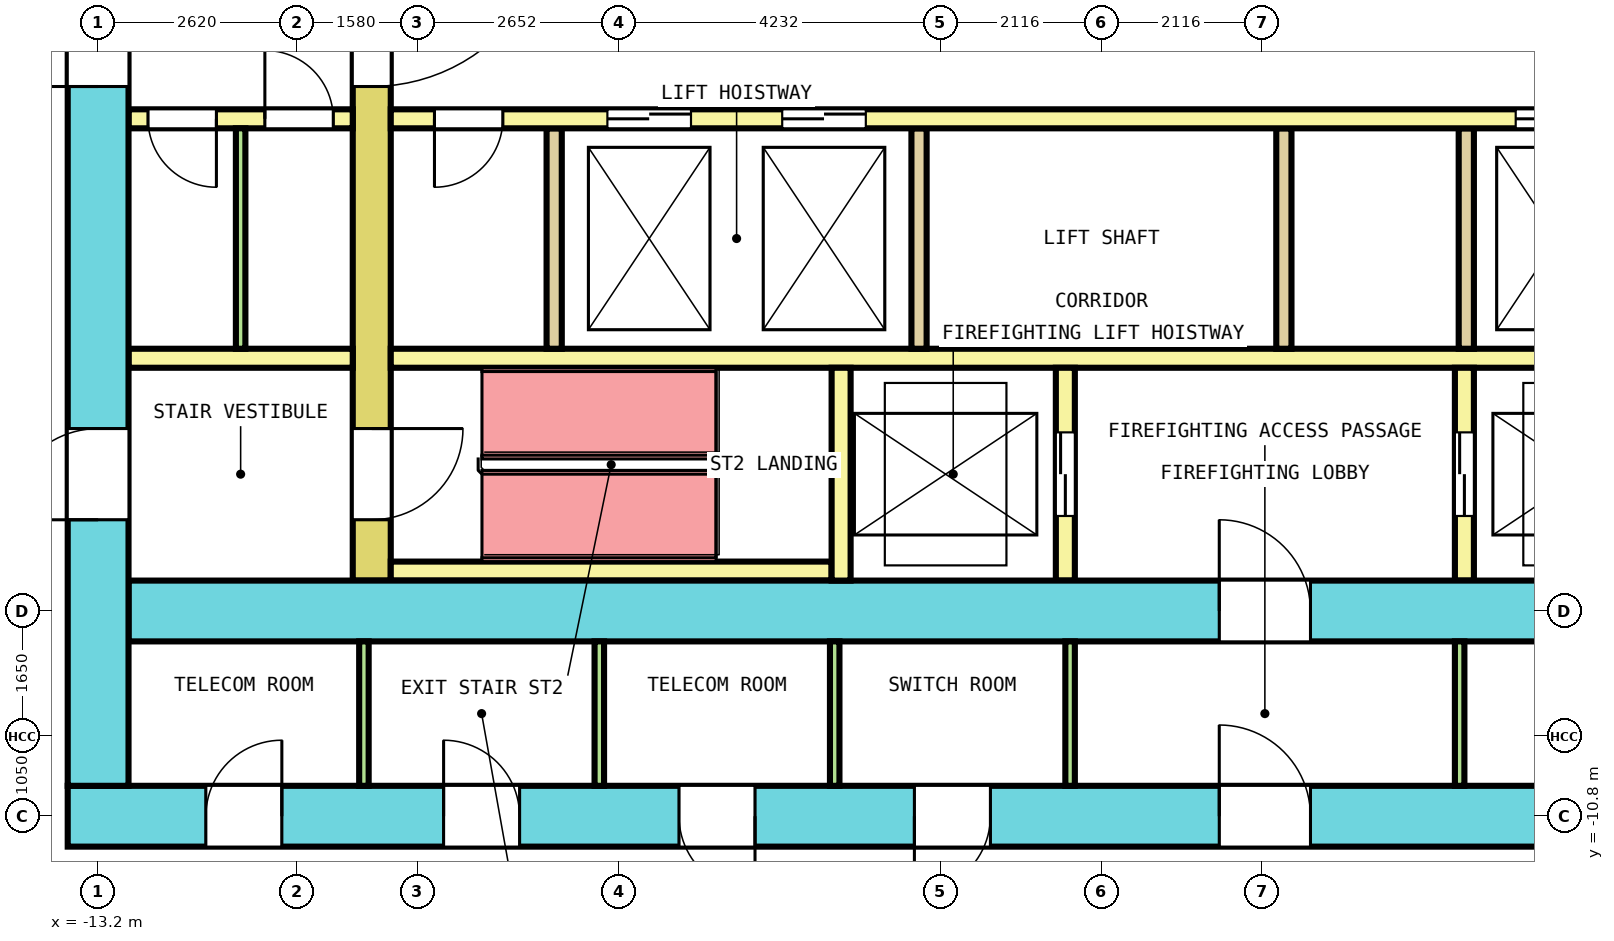
"""IFC4 building model, lengths in metres.
Left out: names, types, materials, properties, quantities, classifications, styles, units other than length and angle.
Written with IfcOpenShell. Run it as: python <this file> out.ifc"""

import sys

from ifc_helpers import new_model, si_unit, direction, frame, frame_2d, origin, place, context, subcontext, project, spatial, rectangle, extrude, element, fill, save


model = new_model("IFC4")
c1 = context("Model", 3, precision=1e-05, world=origin(), true_north=direction((0.0, 1.0)))
c2 = subcontext(c1, "Body", "Model", "MODEL_VIEW")
j1 = project(units=[si_unit("LENGTHUNIT", "METRE"), si_unit("PLANEANGLEUNIT", "RADIAN")], contexts=[c1])
p1 = place(None, origin())
s1 = spatial("IfcSite", under=j1, at=p1, CompositionType="ELEMENT")
p2 = place(p1, origin())
s2 = spatial("IfcBuilding", under=s1, at=p2, CompositionType="ELEMENT")
p3 = place(p2, frame((0.0, 0.0, 113.2)))
s3 = spatial("IfcBuildingStorey", under=s2, at=p3, CompositionType="ELEMENT", Elevation=113.2)
p4 = place(p3, frame((-13.6, -10.8, 0.0), z_axis=(0.0, 0.0, 1.0), x_axis=(1.0, 0.0, 0.0)))
e1 = element("IfcWall", 1, at=p4, inside=s3, PredefinedType="SHEAR", context=c2, shape_type="SweptSolid", body=[
    extrude(rectangle(XDim=27.2, YDim=0.8, at=frame_2d((13.6, 0.0))), origin(), (0.0, 0.0, 1.0), 4.1),
])
p5 = place(p4, frame((1.817, 0.0, 0.0)))
e2 = element("IfcOpeningElement", 2, at=p5, cuts=e1, PredefinedType="OPENING", context=c2, shape_type="SweptSolid", body=[
    extrude(rectangle(XDim=1.0, YDim=2.1, at=frame_2d((0.5, 1.05))), frame((0.0, 0.41, 0.0), z_axis=(0.0, -1.0, 0.0), x_axis=(1.0, 0.0, 0.0)), (0.0, 0.0, 1.0), 0.82),
])
p6 = place(p4, frame((4.945, 0.0, 0.0)))
e3 = element("IfcOpeningElement", 3, at=p6, cuts=e1, PredefinedType="OPENING", context=c2, shape_type="SweptSolid", body=[
    extrude(rectangle(XDim=1.0, YDim=2.1, at=frame_2d((0.5, 1.05))), frame((0.0, 0.41, 0.0), z_axis=(0.0, -1.0, 0.0), x_axis=(1.0, 0.0, 0.0)), (0.0, 0.0, 1.0), 0.82),
])
p7 = place(p4, frame((8.042, 0.0, 0.0)))
e4 = element("IfcOpeningElement", 4, at=p7, cuts=e1, PredefinedType="OPENING", context=c2, shape_type="SweptSolid", body=[
    extrude(rectangle(XDim=1.0, YDim=2.1, at=frame_2d((0.5, 1.05))), frame((0.0, 0.41, 0.0), z_axis=(0.0, -1.0, 0.0), x_axis=(1.0, 0.0, 0.0)), (0.0, 0.0, 1.0), 0.82),
])
p8 = place(p4, frame((11.139, 0.0, 0.0)))
e5 = element("IfcOpeningElement", 5, at=p8, cuts=e1, PredefinedType="OPENING", context=c2, shape_type="SweptSolid", body=[
    extrude(rectangle(XDim=1.0, YDim=2.1, at=frame_2d((0.5, 1.05))), frame((0.0, 0.41, 0.0), z_axis=(0.0, -1.0, 0.0), x_axis=(1.0, 0.0, 0.0)), (0.0, 0.0, 1.0), 0.82),
])
p9 = place(p4, frame((21.887, 0.0, 0.0)))
e6 = element("IfcOpeningElement", 6, at=p9, cuts=e1, PredefinedType="OPENING", context=c2, shape_type="SweptSolid", body=[
    extrude(rectangle(XDim=1.0, YDim=2.1, at=frame_2d((0.5, 1.05))), frame((0.0, 0.41, 0.0), z_axis=(0.0, -1.0, 0.0), x_axis=(1.0, 0.0, 0.0)), (0.0, 0.0, 1.0), 0.82),
])
p10 = place(p4, frame((15.15, 0.0, 0.0)))
e7 = element("IfcOpeningElement", 7, at=p10, cuts=e1, PredefinedType="OPENING", context=c2, shape_type="SweptSolid", body=[
    extrude(rectangle(XDim=1.2, YDim=2.1, at=frame_2d((0.6, 1.05))), frame((0.0, 0.41, 0.0), z_axis=(0.0, -1.0, 0.0), x_axis=(1.0, 0.0, 0.0)), (0.0, 0.0, 1.0), 0.82),
])
p11 = place(p3, frame((-13.2, -10.4, 0.0), z_axis=(0.0, 0.0, 1.0), x_axis=(0.0, 1.0, 0.0)))
e8 = element("IfcWall", 8, at=p11, inside=s3, PredefinedType="SHEAR", context=c2, shape_type="SweptSolid", body=[
    extrude(rectangle(XDim=20.8, YDim=0.8, at=frame_2d((10.4, 0.0))), origin(), (0.0, 0.0, 1.0), 4.1),
])
p12 = place(p11, frame((9.2, 0.0, 0.0)))
e9 = element("IfcOpeningElement", 9, at=p12, cuts=e8, PredefinedType="OPENING", context=c2, shape_type="SweptSolid", body=[
    extrude(rectangle(XDim=2.4, YDim=2.1, at=frame_2d((1.2, 1.05))), frame((0.0, 0.41, 0.0), z_axis=(0.0, -1.0, 0.0), x_axis=(1.0, 0.0, 0.0)), (0.0, 0.0, 1.0), 0.82),
])
p13 = place(p11, frame((16.1, 0.0, 0.0)))
e10 = element("IfcOpeningElement", 10, at=p13, cuts=e8, PredefinedType="OPENING", context=c2, shape_type="SweptSolid", body=[
    extrude(rectangle(XDim=1.2, YDim=2.1, at=frame_2d((0.6, 1.05))), frame((0.0, 0.41, 0.0), z_axis=(0.0, -1.0, 0.0), x_axis=(1.0, 0.0, 0.0)), (0.0, 0.0, 1.0), 0.82),
])
p14 = place(p11, frame((3.5, 0.0, 0.0)))
e11 = element("IfcOpeningElement", 11, at=p14, cuts=e8, PredefinedType="OPENING", context=c2, shape_type="SweptSolid", body=[
    extrude(rectangle(XDim=1.2, YDim=2.1, at=frame_2d((0.6, 1.05))), frame((0.0, 0.41, 0.0), z_axis=(0.0, -1.0, 0.0), x_axis=(1.0, 0.0, 0.0)), (0.0, 0.0, 1.0), 0.82),
])
p15 = place(p3, frame((-12.8, -8.1, 0.0), z_axis=(0.0, 0.0, 1.0), x_axis=(1.0, 0.0, 0.0)))
e12 = element("IfcWall", 12, at=p15, inside=s3, PredefinedType="SHEAR", context=c2, shape_type="SweptSolid", body=[
    extrude(rectangle(XDim=25.6, YDim=0.8, at=frame_2d((12.8, 0.0))), origin(), (0.0, 0.0, 1.0), 4.1),
])
p16 = place(p15, frame((14.35, 0.0, 0.0)))
e13 = element("IfcOpeningElement", 13, at=p16, cuts=e12, PredefinedType="OPENING", context=c2, shape_type="SweptSolid", body=[
    extrude(rectangle(XDim=1.2, YDim=2.1, at=frame_2d((0.6, 1.05))), frame((0.0, 0.41, 0.0), z_axis=(0.0, -1.0, 0.0), x_axis=(1.0, 0.0, 0.0)), (0.0, 0.0, 1.0), 0.82),
])
p17 = place(p3, frame((-9.6, -7.7, 0.0), z_axis=(0.0, 0.0, 1.0), x_axis=(0.0, 1.0, 0.0)))
e14 = element("IfcWall", 14, at=p17, inside=s3, PredefinedType="SHEAR", context=c2, shape_type="SweptSolid", body=[
    extrude(rectangle(XDim=15.4, YDim=0.5, at=frame_2d((7.7, 0.0))), origin(), (0.0, 0.0, 1.0), 4.1),
])
p18 = place(p17, frame((6.5, 0.0, 0.0)))
e15 = element("IfcOpeningElement", 15, at=p18, cuts=e14, PredefinedType="OPENING", context=c2, shape_type="SweptSolid", body=[
    extrude(rectangle(XDim=2.4, YDim=2.1, at=frame_2d((1.2, 1.05))), frame((0.0, 0.26, 0.0), z_axis=(0.0, -1.0, 0.0), x_axis=(1.0, 0.0, 0.0)), (0.0, 0.0, 1.0), 0.52),
])
p19 = place(p17, frame((13.4, 0.0, 0.0)))
e16 = element("IfcOpeningElement", 16, at=p19, cuts=e14, PredefinedType="OPENING", context=c2, shape_type="SweptSolid", body=[
    extrude(rectangle(XDim=1.2, YDim=2.1, at=frame_2d((0.6, 1.05))), frame((0.0, 0.26, 0.0), z_axis=(0.0, -1.0, 0.0), x_axis=(1.0, 0.0, 0.0)), (0.0, 0.0, 1.0), 0.52),
])
p20 = place(p17, frame((0.8, 0.0, 0.0)))
e17 = element("IfcOpeningElement", 17, at=p20, cuts=e14, PredefinedType="OPENING", context=c2, shape_type="SweptSolid", body=[
    extrude(rectangle(XDim=1.2, YDim=2.1, at=frame_2d((0.6, 1.05))), frame((0.0, 0.26, 0.0), z_axis=(0.0, -1.0, 0.0), x_axis=(1.0, 0.0, 0.0)), (0.0, 0.0, 1.0), 0.52),
])
p21 = place(p3, frame((-12.8, -1.625, 0.0), z_axis=(0.0, 0.0, 1.0), x_axis=(1.0, 0.0, 0.0)))
e18 = element("IfcWall", 18, at=p21, inside=s3, PredefinedType="SOLIDWALL", context=c2, shape_type="SweptSolid", body=[
    extrude(rectangle(XDim=2.95, YDim=0.25, at=frame_2d((1.475, 0.0))), origin(), (0.0, 0.0, 1.0), 4.1),
])
p22 = place(p21, frame((0.256, 0.0, 0.0)))
e19 = element("IfcOpeningElement", 19, at=p22, cuts=e18, PredefinedType="OPENING", context=c2, shape_type="SweptSolid", body=[
    extrude(rectangle(XDim=0.9, YDim=2.1, at=frame_2d((0.45, 1.05))), frame((0.0, 0.135, 0.0), z_axis=(0.0, -1.0, 0.0), x_axis=(1.0, 0.0, 0.0)), (0.0, 0.0, 1.0), 0.27),
])
p23 = place(p21, frame((1.794, 0.0, 0.0)))
e20 = element("IfcOpeningElement", 20, at=p23, cuts=e18, PredefinedType="OPENING", context=c2, shape_type="SweptSolid", body=[
    extrude(rectangle(XDim=0.9, YDim=2.1, at=frame_2d((0.45, 1.05))), frame((0.0, 0.135, 0.0), z_axis=(0.0, -1.0, 0.0), x_axis=(1.0, 0.0, 0.0)), (0.0, 0.0, 1.0), 0.27),
])
p24 = place(p3, frame((-9.35, -1.625, 0.0), z_axis=(0.0, 0.0, 1.0), x_axis=(1.0, 0.0, 0.0)))
e21 = element("IfcWall", 21, at=p24, inside=s3, PredefinedType="SOLIDWALL", context=c2, shape_type="SweptSolid", body=[
    extrude(rectangle(XDim=18.7, YDim=0.25, at=frame_2d((9.35, 0.0))), origin(), (0.0, 0.0, 1.0), 4.1),
])
p25 = place(p24, frame((2.85, 0.0, 0.0)))
e22 = element("IfcOpeningElement", 22, at=p25, cuts=e21, PredefinedType="OPENING", context=c2, shape_type="SweptSolid", body=[
    extrude(rectangle(XDim=1.1, YDim=2.1, at=frame_2d((0.55, 1.05))), frame((0.0, 0.135, 0.0), z_axis=(0.0, -1.0, 0.0), x_axis=(1.0, 0.0, 0.0)), (0.0, 0.0, 1.0), 0.27),
])
p26 = place(p24, frame((5.15, 0.0, 0.0)))
e23 = element("IfcOpeningElement", 23, at=p26, cuts=e21, PredefinedType="OPENING", context=c2, shape_type="SweptSolid", body=[
    extrude(rectangle(XDim=1.1, YDim=2.1, at=frame_2d((0.55, 1.05))), frame((0.0, 0.135, 0.0), z_axis=(0.0, -1.0, 0.0), x_axis=(1.0, 0.0, 0.0)), (0.0, 0.0, 1.0), 0.27),
])
p27 = place(p24, frame((14.8, 0.0, 0.0)))
e24 = element("IfcOpeningElement", 24, at=p27, cuts=e21, PredefinedType="OPENING", context=c2, shape_type="SweptSolid", body=[
    extrude(rectangle(XDim=1.1, YDim=2.1, at=frame_2d((0.55, 1.05))), frame((0.0, 0.135, 0.0), z_axis=(0.0, -1.0, 0.0), x_axis=(1.0, 0.0, 0.0)), (0.0, 0.0, 1.0), 0.27),
])
p28 = place(p24, frame((0.575, 0.0, 0.0)))
e25 = element("IfcOpeningElement", 25, at=p28, cuts=e21, PredefinedType="OPENING", context=c2, shape_type="SweptSolid", body=[
    extrude(rectangle(XDim=0.9, YDim=2.1, at=frame_2d((0.45, 1.05))), frame((0.0, 0.135, 0.0), z_axis=(0.0, -1.0, 0.0), x_axis=(1.0, 0.0, 0.0)), (0.0, 0.0, 1.0), 0.27),
])
p29 = place(p24, frame((17.225, 0.0, 0.0)))
e26 = element("IfcOpeningElement", 26, at=p29, cuts=e21, PredefinedType="OPENING", context=c2, shape_type="SweptSolid", body=[
    extrude(rectangle(XDim=0.9, YDim=2.1, at=frame_2d((0.45, 1.05))), frame((0.0, 0.135, 0.0), z_axis=(0.0, -1.0, 0.0), x_axis=(1.0, 0.0, 0.0)), (0.0, 0.0, 1.0), 0.27),
])
p30 = place(p3, frame((-12.8, -4.775, 0.0), z_axis=(0.0, 0.0, 1.0), x_axis=(1.0, 0.0, 0.0)))
e27 = element("IfcWall", 27, at=p30, inside=s3, PredefinedType="SOLIDWALL", context=c2, shape_type="SweptSolid", body=[
    extrude(rectangle(XDim=2.95, YDim=0.25, at=frame_2d((1.475, 0.0))), origin(), (0.0, 0.0, 1.0), 4.1),
])
p31 = place(p3, frame((-9.35, -4.775, 0.0), z_axis=(0.0, 0.0, 1.0), x_axis=(1.0, 0.0, 0.0)))
e28 = element("IfcWall", 28, at=p31, inside=s3, PredefinedType="SOLIDWALL", context=c2, shape_type="SweptSolid", body=[
    extrude(rectangle(XDim=18.7, YDim=0.25, at=frame_2d((9.35, 0.0))), origin(), (0.0, 0.0, 1.0), 4.1),
])
for number, where, z_axis, x_axis in (
    (29, (-7.2, -4.65, 0.0), (0.0, 0.0, 1.0), (0.0, 1.0, 0.0)),
    (30, (-2.4, -4.65, 0.0), (0.0, 0.0, 1.0), (0.0, 1.0, 0.0)),
    (31, (2.4, -4.65, 0.0), (0.0, 0.0, 1.0), (0.0, 1.0, 0.0)),
    (32, (4.8, -4.65, 0.0), (0.0, 0.0, 1.0), (0.0, 1.0, 0.0)),
):
    element("IfcWall", number, at=place(p3, frame(where, z_axis=z_axis, x_axis=x_axis)), inside=s3, PredefinedType="SOLIDWALL", context=c2, shape_type="SweptSolid", body=[
        extrude(rectangle(XDim=2.9, YDim=0.2, at=frame_2d((1.45, 0.0))), origin(), (0.0, 0.0, 1.0), 4.1),
    ])
p32 = place(p3, frame((-9.35, -7.575, 0.0), z_axis=(0.0, 0.0, 1.0), x_axis=(1.0, 0.0, 0.0)))
e33 = element("IfcWall", 33, at=p32, inside=s3, PredefinedType="SOLIDWALL", context=c2, shape_type="SweptSolid", body=[
    extrude(rectangle(XDim=5.8, YDim=0.25, at=frame_2d((2.9, 0.0))), origin(), (0.0, 0.0, 1.0), 4.1),
])
p33 = place(p3, frame((-3.425, -7.7, 0.0), z_axis=(0.0, 0.0, 1.0), x_axis=(0.0, 1.0, 0.0)))
e34 = element("IfcWall", 34, at=p33, inside=s3, PredefinedType="SOLIDWALL", context=c2, shape_type="SweptSolid", body=[
    extrude(rectangle(XDim=2.8, YDim=0.25, at=frame_2d((1.4, 0.0))), origin(), (0.0, 0.0, 1.0), 4.1),
])
p34 = place(p3, frame((-0.475, -7.7, 0.0), z_axis=(0.0, 0.0, 1.0), x_axis=(0.0, 1.0, 0.0)))
e35 = element("IfcWall", 35, at=p34, inside=s3, PredefinedType="SOLIDWALL", context=c2, shape_type="SweptSolid", body=[
    extrude(rectangle(XDim=2.8, YDim=0.25, at=frame_2d((1.4, 0.0))), origin(), (0.0, 0.0, 1.0), 4.1),
])
p35 = place(p34, frame((0.85, 0.0, 0.0)))
e36 = element("IfcOpeningElement", 36, at=p35, cuts=e35, PredefinedType="OPENING", context=c2, shape_type="SweptSolid", body=[
    extrude(rectangle(XDim=1.1, YDim=2.1, at=frame_2d((0.55, 1.05))), frame((0.0, 0.135, 0.0), z_axis=(0.0, -1.0, 0.0), x_axis=(1.0, 0.0, 0.0)), (0.0, 0.0, 1.0), 0.27),
])
p36 = place(p3, frame((4.775, -7.7, 0.0), z_axis=(0.0, 0.0, 1.0), x_axis=(0.0, 1.0, 0.0)))
e37 = element("IfcWall", 37, at=p36, inside=s3, PredefinedType="SOLIDWALL", context=c2, shape_type="SweptSolid", body=[
    extrude(rectangle(XDim=2.8, YDim=0.25, at=frame_2d((1.4, 0.0))), origin(), (0.0, 0.0, 1.0), 4.1),
])
p37 = place(p36, frame((0.85, 0.0, 0.0)))
e38 = element("IfcOpeningElement", 38, at=p37, cuts=e37, PredefinedType="OPENING", context=c2, shape_type="SweptSolid", body=[
    extrude(rectangle(XDim=1.1, YDim=2.1, at=frame_2d((0.55, 1.05))), frame((0.0, 0.135, 0.0), z_axis=(0.0, -1.0, 0.0), x_axis=(1.0, 0.0, 0.0)), (0.0, 0.0, 1.0), 0.27),
])
for number, where, z_axis, x_axis in (
    (39, (-9.703, -10.4, 0.0), (0.0, 0.0, 1.0), (0.0, 1.0, 0.0)),
    (40, (-6.606, -10.4, 0.0), (0.0, 0.0, 1.0), (0.0, 1.0, 0.0)),
    (41, (-3.51, -10.4, 0.0), (0.0, 0.0, 1.0), (0.0, 1.0, 0.0)),
    (42, (-0.413, -10.4, 0.0), (0.0, 0.0, 1.0), (0.0, 1.0, 0.0)),
    (43, (4.712, -10.4, 0.0), (0.0, 0.0, 1.0), (0.0, 1.0, 0.0)),
):
    element("IfcWall", number, at=place(p3, frame(where, z_axis=z_axis, x_axis=x_axis)), inside=s3, PredefinedType="PARTITIONING", context=c2, shape_type="SweptSolid", body=[
        extrude(rectangle(XDim=1.9, YDim=0.125, at=frame_2d((0.95, 0.0))), origin(), (0.0, 0.0, 1.0), 4.1),
    ])
p38 = place(p3, frame((-11.325, -4.65, 0.0), z_axis=(0.0, 0.0, 1.0), x_axis=(0.0, 1.0, 0.0)))
e44 = element("IfcWall", 44, at=p38, inside=s3, PredefinedType="PARTITIONING", context=c2, shape_type="SweptSolid", body=[
    extrude(rectangle(XDim=2.9, YDim=0.125, at=frame_2d((1.45, 0.0))), origin(), (0.0, 0.0, 1.0), 4.1),
])
p39 = place(p25, origin())
e45 = element("IfcDoor", 45, at=p39, inside=s3, OperationType="DOUBLE_DOOR_SLIDING", PredefinedType="DOOR", context=c2, shape_type="SweptSolid", body=[
    extrude(rectangle(XDim=1.1, YDim=2.1, at=frame_2d((0.55, 1.05))), frame((0.0, 0.075, 0.0), z_axis=(0.0, -1.0, 0.0), x_axis=(1.0, 0.0, 0.0)), (0.0, 0.0, 1.0), 0.15),
])
fill(e22, e45)
p40 = place(p26, origin())
e46 = element("IfcDoor", 46, at=p40, inside=s3, OperationType="DOUBLE_DOOR_SLIDING", PredefinedType="DOOR", context=c2, shape_type="SweptSolid", body=[
    extrude(rectangle(XDim=1.1, YDim=2.1, at=frame_2d((0.55, 1.05))), frame((0.0, 0.075, 0.0), z_axis=(0.0, -1.0, 0.0), x_axis=(1.0, 0.0, 0.0)), (0.0, 0.0, 1.0), 0.15),
])
fill(e23, e46)
p41 = place(p27, origin())
e47 = element("IfcDoor", 47, at=p41, inside=s3, OperationType="DOUBLE_DOOR_SLIDING", PredefinedType="DOOR", context=c2, shape_type="SweptSolid", body=[
    extrude(rectangle(XDim=1.1, YDim=2.1, at=frame_2d((0.55, 1.05))), frame((0.0, 0.075, 0.0), z_axis=(0.0, -1.0, 0.0), x_axis=(1.0, 0.0, 0.0)), (0.0, 0.0, 1.0), 0.15),
])
fill(e24, e47)
p42 = place(p35, origin())
e48 = element("IfcDoor", 48, at=p42, inside=s3, OperationType="DOUBLE_DOOR_SLIDING", PredefinedType="DOOR", context=c2, shape_type="SweptSolid", body=[
    extrude(rectangle(XDim=1.1, YDim=2.1, at=frame_2d((0.55, 1.05))), frame((0.0, 0.075, 0.0), z_axis=(0.0, -1.0, 0.0), x_axis=(1.0, 0.0, 0.0)), (0.0, 0.0, 1.0), 0.15),
])
fill(e36, e48)
p43 = place(p37, origin())
e49 = element("IfcDoor", 49, at=p43, inside=s3, OperationType="DOUBLE_DOOR_SLIDING", PredefinedType="DOOR", context=c2, shape_type="SweptSolid", body=[
    extrude(rectangle(XDim=1.1, YDim=2.1, at=frame_2d((0.55, 1.05))), frame((0.0, 0.075, 0.0), z_axis=(0.0, -1.0, 0.0), x_axis=(1.0, 0.0, 0.0)), (0.0, 0.0, 1.0), 0.15),
])
fill(e38, e49)
p44 = place(p18, origin())
e50 = element("IfcDoor", 50, at=p44, inside=s3, OperationType="DOUBLE_DOOR_SINGLE_SWING", PredefinedType="DOOR", context=c2, shape_type="SweptSolid", body=[
    extrude(rectangle(XDim=2.4, YDim=2.1, at=frame_2d((1.2, 1.05))), frame((0.0, 0.2, 0.0), z_axis=(0.0, -1.0, 0.0), x_axis=(1.0, 0.0, 0.0)), (0.0, 0.0, 1.0), 0.4),
])
fill(e15, e50)
p45 = place(p12, origin())
e51 = element("IfcDoor", 51, at=p45, inside=s3, OperationType="DOUBLE_DOOR_SINGLE_SWING", PredefinedType="DOOR", context=c2, shape_type="SweptSolid", body=[
    extrude(rectangle(XDim=2.4, YDim=2.1, at=frame_2d((1.2, 1.05))), frame((0.0, 0.3, 0.0), z_axis=(0.0, -1.0, 0.0), x_axis=(1.0, 0.0, 0.0)), (0.0, 0.0, 1.0), 0.6),
])
fill(e9, e51)
p46 = place(p20, origin())
e52 = element("IfcDoor", 52, at=p46, inside=s3, OperationType="SINGLE_SWING_RIGHT", PredefinedType="DOOR", context=c2, shape_type="SweptSolid", body=[
    extrude(rectangle(XDim=1.2, YDim=2.1, at=frame_2d((0.6, 1.05))), frame((0.0, 0.2, 0.0), z_axis=(0.0, -1.0, 0.0), x_axis=(1.0, 0.0, 0.0)), (0.0, 0.0, 1.0), 0.4),
])
fill(e17, e52)
p47 = place(p14, origin())
e53 = element("IfcDoor", 53, at=p47, inside=s3, OperationType="SINGLE_SWING_LEFT", PredefinedType="DOOR", context=c2, shape_type="SweptSolid", body=[
    extrude(rectangle(XDim=1.2, YDim=2.1, at=frame_2d((0.6, 1.05))), frame((0.0, 0.3, 0.0), z_axis=(0.0, -1.0, 0.0), x_axis=(1.0, 0.0, 0.0)), (0.0, 0.0, 1.0), 0.6),
])
fill(e11, e53)
p48 = place(p16, origin())
e54 = element("IfcDoor", 54, at=p48, inside=s3, OperationType="SINGLE_SWING_RIGHT", PredefinedType="DOOR", context=c2, shape_type="SweptSolid", body=[
    extrude(rectangle(XDim=1.2, YDim=2.1, at=frame_2d((0.6, 1.05))), frame((0.0, 0.3, 0.0), z_axis=(0.0, -1.0, 0.0), x_axis=(1.0, 0.0, 0.0)), (0.0, 0.0, 1.0), 0.6),
])
fill(e13, e54)
p49 = place(p5, origin())
e55 = element("IfcDoor", 55, at=p49, inside=s3, OperationType="SINGLE_SWING_LEFT", PredefinedType="DOOR", context=c2, shape_type="SweptSolid", body=[
    extrude(rectangle(XDim=1.0, YDim=2.1, at=frame_2d((0.5, 1.05))), frame((0.0, 0.3, 0.0), z_axis=(0.0, -1.0, 0.0), x_axis=(1.0, 0.0, 0.0)), (0.0, 0.0, 1.0), 0.6),
])
fill(e2, e55)
p50 = place(p6, origin())
e56 = element("IfcDoor", 56, at=p50, inside=s3, OperationType="SINGLE_SWING_RIGHT", PredefinedType="DOOR", context=c2, shape_type="SweptSolid", body=[
    extrude(rectangle(XDim=1.0, YDim=2.1, at=frame_2d((0.5, 1.05))), frame((0.0, 0.3, 0.0), z_axis=(0.0, -1.0, 0.0), x_axis=(1.0, 0.0, 0.0)), (0.0, 0.0, 1.0), 0.6),
])
fill(e3, e56)
p51 = place(p7, origin())
e57 = element("IfcDoor", 57, at=p51, inside=s3, OperationType="SINGLE_SWING_LEFT", PredefinedType="DOOR", context=c2, shape_type="SweptSolid", body=[
    extrude(rectangle(XDim=1.0, YDim=2.1, at=frame_2d((0.5, 1.05))), frame((0.0, 0.3, 0.0), z_axis=(0.0, -1.0, 0.0), x_axis=(1.0, 0.0, 0.0)), (0.0, 0.0, 1.0), 0.6),
])
fill(e4, e57)
p52 = place(p8, origin())
e58 = element("IfcDoor", 58, at=p52, inside=s3, OperationType="SINGLE_SWING_RIGHT", PredefinedType="DOOR", context=c2, shape_type="SweptSolid", body=[
    extrude(rectangle(XDim=1.0, YDim=2.1, at=frame_2d((0.5, 1.05))), frame((0.0, 0.3, 0.0), z_axis=(0.0, -1.0, 0.0), x_axis=(1.0, 0.0, 0.0)), (0.0, 0.0, 1.0), 0.6),
])
fill(e5, e58)
p53 = place(p10, origin())
e59 = element("IfcDoor", 59, at=p53, inside=s3, OperationType="SINGLE_SWING_RIGHT", PredefinedType="DOOR", context=c2, shape_type="SweptSolid", body=[
    extrude(rectangle(XDim=1.2, YDim=2.1, at=frame_2d((0.6, 1.05))), frame((0.0, 0.3, 0.0), z_axis=(0.0, -1.0, 0.0), x_axis=(1.0, 0.0, 0.0)), (0.0, 0.0, 1.0), 0.6),
])
fill(e7, e59)
p54 = place(p22, origin())
e60 = element("IfcDoor", 60, at=p54, inside=s3, OperationType="SINGLE_SWING_LEFT", PredefinedType="DOOR", context=c2, shape_type="SweptSolid", body=[
    extrude(rectangle(XDim=0.9, YDim=2.1, at=frame_2d((0.45, 1.05))), frame((0.0, 0.075, 0.0), z_axis=(0.0, -1.0, 0.0), x_axis=(1.0, 0.0, 0.0)), (0.0, 0.0, 1.0), 0.15),
])
fill(e19, e60)
p55 = place(p23, origin())
e61 = element("IfcDoor", 61, at=p55, inside=s3, OperationType="SINGLE_SWING_RIGHT", PredefinedType="DOOR", context=c2, shape_type="SweptSolid", body=[
    extrude(rectangle(XDim=0.9, YDim=2.1, at=frame_2d((0.45, 1.05))), frame((0.0, 0.075, 0.0), z_axis=(0.0, -1.0, 0.0), x_axis=(1.0, 0.0, 0.0)), (0.0, 0.0, 1.0), 0.15),
])
fill(e20, e61)
p56 = place(p28, origin())
e62 = element("IfcDoor", 62, at=p56, inside=s3, OperationType="SINGLE_SWING_LEFT", PredefinedType="DOOR", context=c2, shape_type="SweptSolid", body=[
    extrude(rectangle(XDim=0.9, YDim=2.1, at=frame_2d((0.45, 1.05))), frame((0.0, 0.075, 0.0), z_axis=(0.0, -1.0, 0.0), x_axis=(1.0, 0.0, 0.0)), (0.0, 0.0, 1.0), 0.15),
])
fill(e25, e62)
save(model, sys.argv[1])
